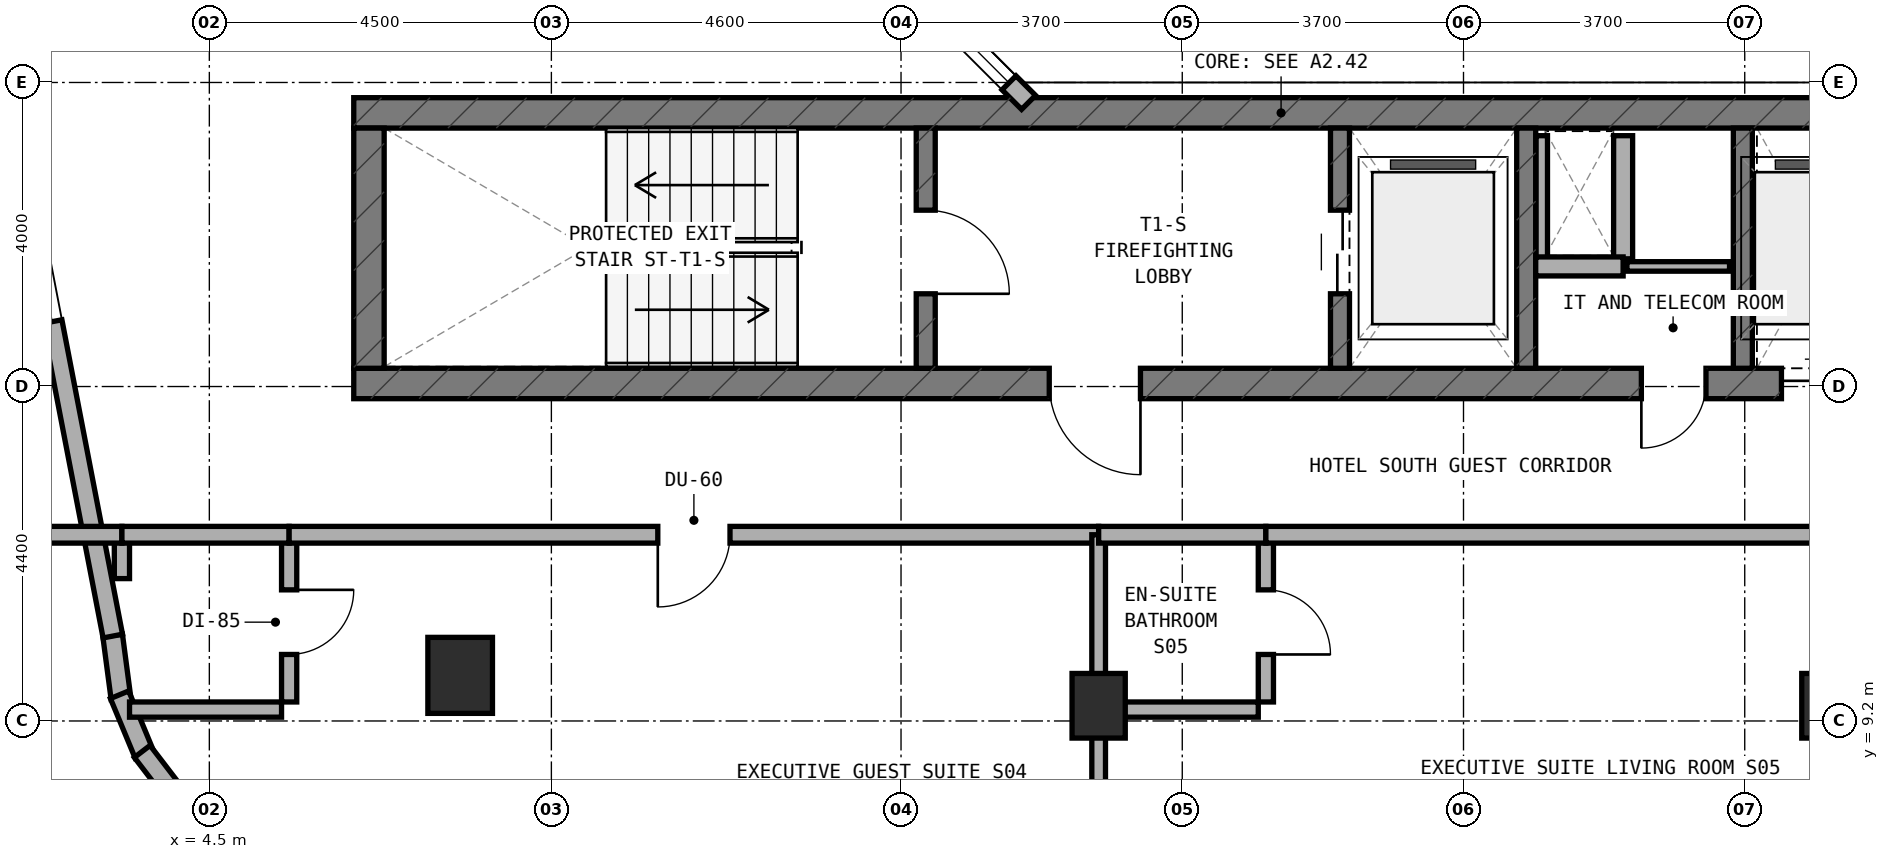
"""IFC4 building model, lengths in metres.
Left out: names, types, materials, properties, quantities, classifications, styles, units other than length and angle.
Written with IfcOpenShell. Run it as: python <this file> out.ifc"""

import sys

from ifc_helpers import new_model, si_unit, direction, frame, frame_2d, origin, origin_2d, place, context, subcontext, project, spatial, rectangle, extrude, element, fill, save


model = new_model("IFC4")
c1 = context("Model", 3, precision=1e-05, world=origin(), true_north=direction((0.0, 1.0)))
c2 = subcontext(c1, "Body", "Model", "MODEL_VIEW")
j1 = project(units=[si_unit("LENGTHUNIT", "METRE"), si_unit("PLANEANGLEUNIT", "RADIAN")], contexts=[c1])
p1 = place(None, origin())
s1 = spatial("IfcSite", under=j1, at=p1, CompositionType="ELEMENT")
p2 = place(p1, origin())
s2 = spatial("IfcBuilding", under=s1, at=p2, CompositionType="ELEMENT")
p3 = place(p2, frame((0.0, 0.0, 195.5)))
s3 = spatial("IfcBuildingStorey", under=s2, at=p3, CompositionType="ELEMENT", Elevation=195.5)
p4 = place(p3, frame((6.4, 13.64, 0.0), z_axis=(0.0, 0.0, 1.0), x_axis=(1.0, 0.0, 0.0)))
e1 = element("IfcWall", 1, at=p4, inside=s3, PredefinedType="SHEAR", context=c2, shape_type="SweptSolid", body=[
    extrude(rectangle(XDim=24.4, YDim=0.4, at=frame_2d((12.2, 0.0))), origin(), (0.0, 0.0, 1.0), 3.6),
])
p5 = place(p4, frame((9.15, 0.0, 0.0)))
e2 = element("IfcOpeningElement", 2, at=p5, cuts=e1, PredefinedType="OPENING", context=c2, shape_type="SweptSolid", body=[
    extrude(rectangle(XDim=1.2, YDim=2.15, at=frame_2d((0.6, 1.075))), frame((0.0, 0.21, 0.0), z_axis=(0.0, -1.0, 0.0), x_axis=(1.0, 0.0, 0.0)), (0.0, 0.0, 1.0), 0.42),
])
p6 = place(p4, frame((16.94, 0.0, 0.0)))
e3 = element("IfcOpeningElement", 3, at=p6, cuts=e1, PredefinedType="OPENING", context=c2, shape_type="SweptSolid", body=[
    extrude(rectangle(XDim=0.85, YDim=2.1, at=frame_2d((0.425, 1.05))), frame((0.0, 0.21, 0.0), z_axis=(0.0, -1.0, 0.0), x_axis=(1.0, 0.0, 0.0)), (0.0, 0.0, 1.0), 0.42),
])
p7 = place(p4, frame((18.783, 0.0, 0.0)))
e4 = element("IfcOpeningElement", 4, at=p7, cuts=e1, PredefinedType="OPENING", context=c2, shape_type="SweptSolid", body=[
    extrude(rectangle(XDim=1.1, YDim=2.15, at=frame_2d((0.55, 1.075))), frame((0.0, 0.21, 0.0), z_axis=(0.0, -1.0, 0.0), x_axis=(1.0, 0.0, 0.0)), (0.0, 0.0, 1.0), 0.42),
])
p8 = place(p4, frame((20.65, 0.0, 0.0)))
e5 = element("IfcOpeningElement", 5, at=p8, cuts=e1, PredefinedType="OPENING", context=c2, shape_type="SweptSolid", body=[
    extrude(rectangle(XDim=1.1, YDim=2.15, at=frame_2d((0.55, 1.075))), frame((0.0, 0.21, 0.0), z_axis=(0.0, -1.0, 0.0), x_axis=(1.0, 0.0, 0.0)), (0.0, 0.0, 1.0), 0.42),
])
p9 = place(p4, frame((22.517, 0.0, 0.0)))
e6 = element("IfcOpeningElement", 6, at=p9, cuts=e1, PredefinedType="OPENING", context=c2, shape_type="SweptSolid", body=[
    extrude(rectangle(XDim=1.1, YDim=2.15, at=frame_2d((0.55, 1.075))), frame((0.0, 0.21, 0.0), z_axis=(0.0, -1.0, 0.0), x_axis=(1.0, 0.0, 0.0)), (0.0, 0.0, 1.0), 0.42),
])
p10 = place(p3, frame((6.4, 17.2, 0.0), z_axis=(0.0, 0.0, 1.0), x_axis=(1.0, 0.0, 0.0)))
e7 = element("IfcWall", 7, at=p10, inside=s3, PredefinedType="SHEAR", context=c2, shape_type="SweptSolid", body=[
    extrude(rectangle(XDim=24.4, YDim=0.4, at=frame_2d((12.2, 0.0))), origin(), (0.0, 0.0, 1.0), 3.6),
])
p11 = place(p3, frame((6.6, 13.84, 0.0), z_axis=(0.0, 0.0, 1.0), x_axis=(0.0, 1.0, 0.0)))
e8 = element("IfcWall", 8, at=p11, inside=s3, PredefinedType="SHEAR", context=c2, shape_type="SweptSolid", body=[
    extrude(rectangle(XDim=3.16, YDim=0.4, at=frame_2d((1.58, 0.0))), origin(), (0.0, 0.0, 1.0), 3.6),
])
p12 = place(p3, frame((13.925, 13.84, 0.0), z_axis=(0.0, 0.0, 1.0), x_axis=(0.0, 1.0, 0.0)))
e9 = element("IfcWall", 9, at=p12, inside=s3, PredefinedType="STANDARD", context=c2, shape_type="SweptSolid", body=[
    extrude(rectangle(XDim=3.16, YDim=0.25, at=frame_2d((1.58, 0.0))), origin(), (0.0, 0.0, 1.0), 3.28),
])
p13 = place(p12, frame((0.98, 0.0, 0.0)))
e10 = element("IfcOpeningElement", 10, at=p13, cuts=e9, PredefinedType="OPENING", context=c2, shape_type="SweptSolid", body=[
    extrude(rectangle(XDim=1.1, YDim=2.15, at=frame_2d((0.55, 1.075))), frame((0.0, 0.135, 0.0), z_axis=(0.0, -1.0, 0.0), x_axis=(1.0, 0.0, 0.0)), (0.0, 0.0, 1.0), 0.27),
])
p14 = place(p3, frame((19.375, 13.84, 0.0), z_axis=(0.0, 0.0, 1.0), x_axis=(0.0, 1.0, 0.0)))
e11 = element("IfcWall", 11, at=p14, inside=s3, PredefinedType="STANDARD", context=c2, shape_type="SweptSolid", body=[
    extrude(rectangle(XDim=3.16, YDim=0.25, at=frame_2d((1.58, 0.0))), origin(), (0.0, 0.0, 1.0), 3.28),
])
p15 = place(p14, frame((0.98, 0.0, 0.0)))
e12 = element("IfcOpeningElement", 12, at=p15, cuts=e11, PredefinedType="OPENING", context=c2, shape_type="SweptSolid", body=[
    extrude(rectangle(XDim=1.1, YDim=2.15, at=frame_2d((0.55, 1.075))), frame((0.0, 0.135, 0.0), z_axis=(0.0, -1.0, 0.0), x_axis=(1.0, 0.0, 0.0)), (0.0, 0.0, 1.0), 0.27),
])
for number, where, z_axis, x_axis in (
    (13, (21.825, 13.84, 0.0), (0.0, 0.0, 1.0), (0.0, 1.0, 0.0)),
    (14, (24.675, 13.84, 0.0), (0.0, 0.0, 1.0), (0.0, 1.0, 0.0)),
):
    element("IfcWall", number, at=place(p3, frame(where, z_axis=z_axis, x_axis=x_axis)), inside=s3, PredefinedType="STANDARD", context=c2, shape_type="SweptSolid", body=[
        extrude(rectangle(XDim=3.16, YDim=0.25, at=frame_2d((1.58, 0.0))), origin(), (0.0, 0.0, 1.0), 3.28),
    ])
for number, where, z_axis, x_axis in (
    (15, (16.2, 9.4, 0.0), (0.0, 0.0, 1.0), (1.0, 0.0, 0.0)),
    (16, (25.8, 9.4, 0.0), (0.0, 0.0, 1.0), (1.0, 0.0, 0.0)),
):
    element("IfcColumn", number, at=place(p3, frame(where, z_axis=z_axis, x_axis=x_axis)), inside=s3, PredefinedType="COLUMN", context=c2, shape_type="SweptSolid", body=[
        extrude(rectangle(XDim=0.7, YDim=0.85, at=origin_2d()), origin(), (0.0, 0.0, 1.0), 3.6),
    ])
p16 = place(p3, frame((7.8, 9.8, 0.0), z_axis=(0.0, 0.0, 1.0), x_axis=(1.0, 0.0, 0.0)))
e17 = element("IfcColumn", 17, at=p16, inside=s3, PredefinedType="COLUMN", context=c2, shape_type="SweptSolid", body=[
    extrude(rectangle(XDim=0.85, YDim=1.0, at=origin_2d()), origin(), (0.0, 0.0, 1.0), 3.6),
])
p17 = place(p3, frame((3.228, 10.325, 0.0), z_axis=(0.0, 0.0, 1.0), x_axis=(0.130704676564, -0.99142134712, 0.0)))
e18 = element("IfcWall", 18, at=p17, inside=s3, PredefinedType="STANDARD", context=c2, shape_type="SweptSolid", body=[
    extrude(rectangle(XDim=0.833, YDim=0.26, at=frame_2d((0.417, 0.0))), origin(), (0.0, 0.0, 1.0), 3.28),
])
p18 = place(p3, frame((3.319, 9.545, 0.0), z_axis=(0.0, 0.0, 1.0), x_axis=(0.383086687796, -0.923712395518, 0.0)))
e19 = element("IfcWall", 19, at=p18, inside=s3, PredefinedType="STANDARD", context=c2, shape_type="SweptSolid", body=[
    extrude(rectangle(XDim=0.851, YDim=0.26, at=frame_2d((0.425, 0.0))), origin(), (0.0, 0.0, 1.0), 3.28),
])
p19 = place(p3, frame((3.617, 8.799, 0.0), z_axis=(0.0, 0.0, 1.0), x_axis=(0.608099977432, -0.793860452124, 0.0)))
e20 = element("IfcWall", 20, at=p19, inside=s3, PredefinedType="STANDARD", context=c2, shape_type="SweptSolid", body=[
    extrude(rectangle(XDim=0.85, YDim=0.26, at=frame_2d((0.425, 0.0))), origin(), (0.0, 0.0, 1.0), 3.28),
])
p20 = place(p3, frame((15.278, 17.338, 0.0), z_axis=(0.0, 0.0, 1.0), x_axis=(-0.707106781187, 0.707106781187, 0.0)))
e21 = element("IfcWall", 21, at=p20, inside=s3, PredefinedType="STANDARD", context=c2, shape_type="SweptSolid", body=[
    extrude(rectangle(XDim=2.529, YDim=0.26, at=frame_2d((1.264, 0.0))), origin(), (0.0, 0.0, 1.0), 3.28),
])
p21 = place(p20, frame((0.364, 0.0, 0.85)))
e22 = element("IfcOpeningElement", 22, at=p21, cuts=e21, PredefinedType="OPENING", context=c2, shape_type="SweptSolid", body=[
    extrude(rectangle(XDim=1.8, YDim=1.5, at=frame_2d((0.9, 0.75))), frame((0.0, 0.14, 0.0), z_axis=(0.0, -1.0, 0.0), x_axis=(1.0, 0.0, 0.0)), (0.0, 0.0, 1.0), 0.28),
])
p22 = place(p3, frame((1.518, 19.199, 0.0), z_axis=(0.0, 0.0, 1.0), x_axis=(0.189254809039, -0.98192801022, 0.0)))
e23 = element("IfcWall", 23, at=p22, inside=s3, PredefinedType="STANDARD", context=c2, shape_type="SweptSolid", body=[
    extrude(rectangle(XDim=9.046, YDim=0.26, at=frame_2d((4.523, 0.0))), origin(), (0.0, 0.0, 1.0), 3.28),
])
p23 = place(p22, frame((2.733, 0.0, 0.85)))
e24 = element("IfcOpeningElement", 24, at=p23, cuts=e23, PredefinedType="OPENING", context=c2, shape_type="SweptSolid", body=[
    extrude(rectangle(XDim=2.1, YDim=1.5, at=frame_2d((1.05, 0.75))), frame((0.0, 0.14, 0.0), z_axis=(0.0, -1.0, 0.0), x_axis=(1.0, 0.0, 0.0)), (0.0, 0.0, 1.0), 0.28),
])
p24 = place(p3, frame((22.03, 15.28, 0.0), z_axis=(0.0, 0.0, 1.0), x_axis=(0.0, 1.0, 0.0)))
e25 = element("IfcWall", 25, at=p24, inside=s3, PredefinedType="PARTITIONING", context=c2, shape_type="SweptSolid", body=[
    extrude(rectangle(XDim=1.62, YDim=0.15, at=frame_2d((0.81, 0.0))), origin(), (0.0, 0.0, 1.0), 3.28),
])
p25 = place(p3, frame((23.1, 15.28, 0.0), z_axis=(0.0, 0.0, 1.0), x_axis=(0.0, 1.0, 0.0)))
e26 = element("IfcWall", 26, at=p25, inside=s3, PredefinedType="SOLIDWALL", context=c2, shape_type="SweptSolid", body=[
    extrude(rectangle(XDim=1.62, YDim=0.25, at=frame_2d((0.81, 0.0))), origin(), (0.0, 0.0, 1.0), 3.28),
])
p26 = place(p3, frame((21.95, 15.18, 0.0), z_axis=(0.0, 0.0, 1.0), x_axis=(1.0, 0.0, 0.0)))
e27 = element("IfcWall", 27, at=p26, inside=s3, PredefinedType="SOLIDWALL", context=c2, shape_type="SweptSolid", body=[
    extrude(rectangle(XDim=1.15, YDim=0.25, at=frame_2d((0.575, 0.0))), origin(), (0.0, 0.0, 1.0), 3.28),
])
p27 = place(p3, frame((23.15, 15.18, 0.0), z_axis=(0.0, 0.0, 1.0), x_axis=(1.0, 0.0, 0.0)))
e28 = element("IfcWall", 28, at=p27, inside=s3, PredefinedType="PARTITIONING", context=c2, shape_type="SweptSolid", body=[
    extrude(rectangle(XDim=1.35, YDim=0.125, at=frame_2d((0.675, 0.0))), origin(), (0.0, 0.0, 1.0), 3.28),
])
p28 = place(p3, frame((5.55, 9.45, 0.0), z_axis=(0.0, 0.0, 1.0), x_axis=(0.0, 1.0, 0.0)))
e29 = element("IfcWall", 29, at=p28, inside=s3, PredefinedType="PLUMBINGWALL", context=c2, shape_type="SweptSolid", body=[
    extrude(rectangle(XDim=2.1, YDim=0.2, at=frame_2d((1.05, 0.0))), origin(), (0.0, 0.0, 1.0), 3.28),
])
p29 = place(p28, frame((0.625, 0.0, 0.0)))
e30 = element("IfcOpeningElement", 30, at=p29, cuts=e29, PredefinedType="OPENING", context=c2, shape_type="SweptSolid", body=[
    extrude(rectangle(XDim=0.85, YDim=2.1, at=frame_2d((0.425, 1.05))), frame((0.0, 0.11, 0.0), z_axis=(0.0, -1.0, 0.0), x_axis=(1.0, 0.0, 0.0)), (0.0, 0.0, 1.0), 0.22),
])
p30 = place(p3, frame((3.45, 9.35, 0.0), z_axis=(0.0, 0.0, 1.0), x_axis=(1.0, 0.0, 0.0)))
e31 = element("IfcWall", 31, at=p30, inside=s3, PredefinedType="PLUMBINGWALL", context=c2, shape_type="SweptSolid", body=[
    extrude(rectangle(XDim=2.0, YDim=0.2, at=frame_2d((1.0, 0.0))), origin(), (0.0, 0.0, 1.0), 3.28),
])
p31 = place(p3, frame((3.35, 11.073, 0.0), z_axis=(0.0, 0.0, 1.0), x_axis=(0.0, 1.0, 0.0)))
e32 = element("IfcWall", 32, at=p31, inside=s3, PredefinedType="PLUMBINGWALL", context=c2, shape_type="SweptSolid", body=[
    extrude(rectangle(XDim=0.577, YDim=0.2, at=frame_2d((0.289, 0.0))), origin(), (0.0, 0.0, 1.0), 3.28),
])
p32 = place(p3, frame((1.56, 11.65, 0.0), z_axis=(0.0, 0.0, 1.0), x_axis=(1.0, 0.0, 0.0)))
e33 = element("IfcWall", 33, at=p32, inside=s3, PredefinedType="SOLIDWALL", context=c2, shape_type="SweptSolid", body=[
    extrude(rectangle(XDim=1.79, YDim=0.22, at=frame_2d((0.895, 0.0))), origin(), (0.0, 0.0, 1.0), 3.28),
])
p33 = place(p3, frame((3.35, 11.65, 0.0), z_axis=(0.0, 0.0, 1.0), x_axis=(1.0, 0.0, 0.0)))
e34 = element("IfcWall", 34, at=p33, inside=s3, PredefinedType="SOLIDWALL", context=c2, shape_type="SweptSolid", body=[
    extrude(rectangle(XDim=2.2, YDim=0.22, at=frame_2d((1.1, 0.0))), origin(), (0.0, 0.0, 1.0), 3.28),
])
p34 = place(p3, frame((5.55, 11.65, 0.0), z_axis=(0.0, 0.0, 1.0), x_axis=(1.0, 0.0, 0.0)))
e35 = element("IfcWall", 35, at=p34, inside=s3, PredefinedType="SOLIDWALL", context=c2, shape_type="SweptSolid", body=[
    extrude(rectangle(XDim=10.65, YDim=0.22, at=frame_2d((5.325, 0.0))), origin(), (0.0, 0.0, 1.0), 2.955),
])
p35 = place(p34, frame((4.85, 0.0, 0.0)))
e36 = element("IfcOpeningElement", 36, at=p35, cuts=e35, PredefinedType="OPENING", context=c2, shape_type="SweptSolid", body=[
    extrude(rectangle(XDim=0.95, YDim=2.1, at=frame_2d((0.475, 1.05))), frame((0.0, 0.12, 0.0), z_axis=(0.0, -1.0, 0.0), x_axis=(1.0, 0.0, 0.0)), (0.0, 0.0, 1.0), 0.24),
])
p36 = place(p3, frame((16.2, 5.46, 0.0), z_axis=(0.0, 0.0, 1.0), x_axis=(0.0, 1.0, 0.0)))
e37 = element("IfcWall", 37, at=p36, inside=s3, PredefinedType="SOLIDWALL", context=c2, shape_type="SweptSolid", body=[
    extrude(rectangle(XDim=6.19, YDim=0.18, at=frame_2d((3.095, 0.0))), origin(), (0.0, 0.0, 1.0), 2.895),
])
p37 = place(p3, frame((18.4, 9.45, 0.0), z_axis=(0.0, 0.0, 1.0), x_axis=(0.0, 1.0, 0.0)))
e38 = element("IfcWall", 38, at=p37, inside=s3, PredefinedType="PLUMBINGWALL", context=c2, shape_type="SweptSolid", body=[
    extrude(rectangle(XDim=2.1, YDim=0.2, at=frame_2d((1.05, 0.0))), origin(), (0.0, 0.0, 1.0), 2.895),
])
p38 = place(p37, frame((0.625, 0.0, 0.0)))
e39 = element("IfcOpeningElement", 39, at=p38, cuts=e38, PredefinedType="OPENING", context=c2, shape_type="SweptSolid", body=[
    extrude(rectangle(XDim=0.85, YDim=2.1, at=frame_2d((0.425, 1.05))), frame((0.0, 0.11, 0.0), z_axis=(0.0, -1.0, 0.0), x_axis=(1.0, 0.0, 0.0)), (0.0, 0.0, 1.0), 0.22),
])
p39 = place(p3, frame((16.3, 9.35, 0.0), z_axis=(0.0, 0.0, 1.0), x_axis=(1.0, 0.0, 0.0)))
e40 = element("IfcWall", 40, at=p39, inside=s3, PredefinedType="PLUMBINGWALL", context=c2, shape_type="SweptSolid", body=[
    extrude(rectangle(XDim=2.0, YDim=0.2, at=frame_2d((1.0, 0.0))), origin(), (0.0, 0.0, 1.0), 2.895),
])
p40 = place(p3, frame((16.2, 11.65, 0.0), z_axis=(0.0, 0.0, 1.0), x_axis=(1.0, 0.0, 0.0)))
e41 = element("IfcWall", 41, at=p40, inside=s3, PredefinedType="SOLIDWALL", context=c2, shape_type="SweptSolid", body=[
    extrude(rectangle(XDim=2.2, YDim=0.22, at=frame_2d((1.1, 0.0))), origin(), (0.0, 0.0, 1.0), 2.955),
])
p41 = place(p3, frame((18.4, 11.65, 0.0), z_axis=(0.0, 0.0, 1.0), x_axis=(1.0, 0.0, 0.0)))
e42 = element("IfcWall", 42, at=p41, inside=s3, PredefinedType="SOLIDWALL", context=c2, shape_type="SweptSolid", body=[
    extrude(rectangle(XDim=15.8, YDim=0.22, at=frame_2d((7.9, 0.0))), origin(), (0.0, 0.0, 1.0), 2.955),
])
p42 = place(p41, frame((7.425, 0.0, 0.0)))
e43 = element("IfcOpeningElement", 43, at=p42, cuts=e42, PredefinedType="OPENING", context=c2, shape_type="SweptSolid", body=[
    extrude(rectangle(XDim=0.95, YDim=2.1, at=frame_2d((0.475, 1.05))), frame((0.0, 0.12, 0.0), z_axis=(0.0, -1.0, 0.0), x_axis=(1.0, 0.0, 0.0)), (0.0, 0.0, 1.0), 0.24),
])
p43 = place(p21, origin())
e44 = element("IfcWindow", 44, at=p43, inside=s3, PartitioningType="SINGLE_PANEL", PredefinedType="WINDOW", context=c2, shape_type="SweptSolid", body=[
    extrude(rectangle(XDim=1.8, YDim=1.5, at=frame_2d((0.9, 0.75))), frame((0.0, 0.03, 0.0), z_axis=(0.0, -1.0, 0.0), x_axis=(1.0, 0.0, 0.0)), (0.0, 0.0, 1.0), 0.06),
])
fill(e22, e44)
p44 = place(p23, origin())
e45 = element("IfcWindow", 45, at=p44, inside=s3, PartitioningType="SINGLE_PANEL", PredefinedType="WINDOW", context=c2, shape_type="SweptSolid", body=[
    extrude(rectangle(XDim=2.1, YDim=1.5, at=frame_2d((1.05, 0.75))), frame((0.0, 0.03, 0.0), z_axis=(0.0, -1.0, 0.0), x_axis=(1.0, 0.0, 0.0)), (0.0, 0.0, 1.0), 0.06),
])
fill(e24, e45)
p45 = place(p13, frame((1.1, 0.0, 0.0), z_axis=(0.0, 0.0, 1.0), x_axis=(-1.0, 0.0, 0.0)))
e46 = element("IfcDoor", 46, at=p45, inside=s3, OperationType="SINGLE_SWING_RIGHT", PredefinedType="DOOR", context=c2, shape_type="SweptSolid", body=[
    extrude(rectangle(XDim=1.1, YDim=2.15, at=frame_2d((0.55, 1.075))), frame((0.0, 0.025, 0.0), z_axis=(0.0, -1.0, 0.0), x_axis=(1.0, 0.0, 0.0)), (0.0, 0.0, 1.0), 0.05),
])
fill(e10, e46)
p46 = place(p5, frame((1.2, 0.0, 0.0), z_axis=(0.0, 0.0, 1.0), x_axis=(-1.0, 0.0, 0.0)))
e47 = element("IfcDoor", 47, at=p46, inside=s3, OperationType="SINGLE_SWING_LEFT", PredefinedType="DOOR", context=c2, shape_type="SweptSolid", body=[
    extrude(rectangle(XDim=1.2, YDim=2.15, at=frame_2d((0.6, 1.075))), frame((0.0, 0.025, 0.0), z_axis=(0.0, -1.0, 0.0), x_axis=(1.0, 0.0, 0.0)), (0.0, 0.0, 1.0), 0.05),
])
fill(e2, e47)
p47 = place(p15, origin())
e48 = element("IfcDoor", 48, at=p47, inside=s3, OperationType="DOUBLE_DOOR_SLIDING", PredefinedType="DOOR", context=c2, shape_type="SweptSolid", body=[
    extrude(rectangle(XDim=1.1, YDim=2.15, at=frame_2d((0.55, 1.075))), frame((0.0, 0.025, 0.0), z_axis=(0.0, -1.0, 0.0), x_axis=(1.0, 0.0, 0.0)), (0.0, 0.0, 1.0), 0.05),
])
fill(e12, e48)
p48 = place(p6, frame((0.85, 0.0, 0.0), z_axis=(0.0, 0.0, 1.0), x_axis=(-1.0, 0.0, 0.0)))
e49 = element("IfcDoor", 49, at=p48, inside=s3, OperationType="SINGLE_SWING_RIGHT", PredefinedType="DOOR", context=c2, shape_type="SweptSolid", body=[
    extrude(rectangle(XDim=0.85, YDim=2.1, at=frame_2d((0.425, 1.05))), frame((0.0, 0.025, 0.0), z_axis=(0.0, -1.0, 0.0), x_axis=(1.0, 0.0, 0.0)), (0.0, 0.0, 1.0), 0.05),
])
fill(e3, e49)
p49 = place(p7, frame((1.1, 0.0, 0.0), z_axis=(0.0, 0.0, 1.0), x_axis=(-1.0, 0.0, 0.0)))
e50 = element("IfcDoor", 50, at=p49, inside=s3, OperationType="DOUBLE_DOOR_SLIDING", PredefinedType="DOOR", context=c2, shape_type="SweptSolid", body=[
    extrude(rectangle(XDim=1.1, YDim=2.15, at=frame_2d((0.55, 1.075))), frame((0.0, 0.025, 0.0), z_axis=(0.0, -1.0, 0.0), x_axis=(1.0, 0.0, 0.0)), (0.0, 0.0, 1.0), 0.05),
])
fill(e4, e50)
p50 = place(p29, frame((0.85, 0.0, 0.0), z_axis=(0.0, 0.0, 1.0), x_axis=(-1.0, 0.0, 0.0)))
e51 = element("IfcDoor", 51, at=p50, inside=s3, OperationType="SINGLE_SWING_LEFT", PredefinedType="DOOR", context=c2, shape_type="SweptSolid", body=[
    extrude(rectangle(XDim=0.85, YDim=2.1, at=frame_2d((0.425, 1.05))), frame((0.0, 0.025, 0.0), z_axis=(0.0, -1.0, 0.0), x_axis=(1.0, 0.0, 0.0)), (0.0, 0.0, 1.0), 0.05),
])
fill(e30, e51)
p51 = place(p35, frame((0.95, 0.0, 0.0), z_axis=(0.0, 0.0, 1.0), x_axis=(-1.0, 0.0, 0.0)))
e52 = element("IfcDoor", 52, at=p51, inside=s3, OperationType="SINGLE_SWING_RIGHT", PredefinedType="DOOR", context=c2, shape_type="SweptSolid", body=[
    extrude(rectangle(XDim=0.95, YDim=2.1, at=frame_2d((0.475, 1.05))), frame((0.0, 0.025, 0.0), z_axis=(0.0, -1.0, 0.0), x_axis=(1.0, 0.0, 0.0)), (0.0, 0.0, 1.0), 0.05),
])
fill(e36, e52)
p52 = place(p38, frame((0.85, 0.0, 0.0), z_axis=(0.0, 0.0, 1.0), x_axis=(-1.0, 0.0, 0.0)))
e53 = element("IfcDoor", 53, at=p52, inside=s3, OperationType="SINGLE_SWING_RIGHT", PredefinedType="DOOR", context=c2, shape_type="SweptSolid", body=[
    extrude(rectangle(XDim=0.85, YDim=2.1, at=frame_2d((0.425, 1.05))), frame((0.0, 0.025, 0.0), z_axis=(0.0, -1.0, 0.0), x_axis=(1.0, 0.0, 0.0)), (0.0, 0.0, 1.0), 0.05),
])
fill(e39, e53)
save(model, sys.argv[1])
